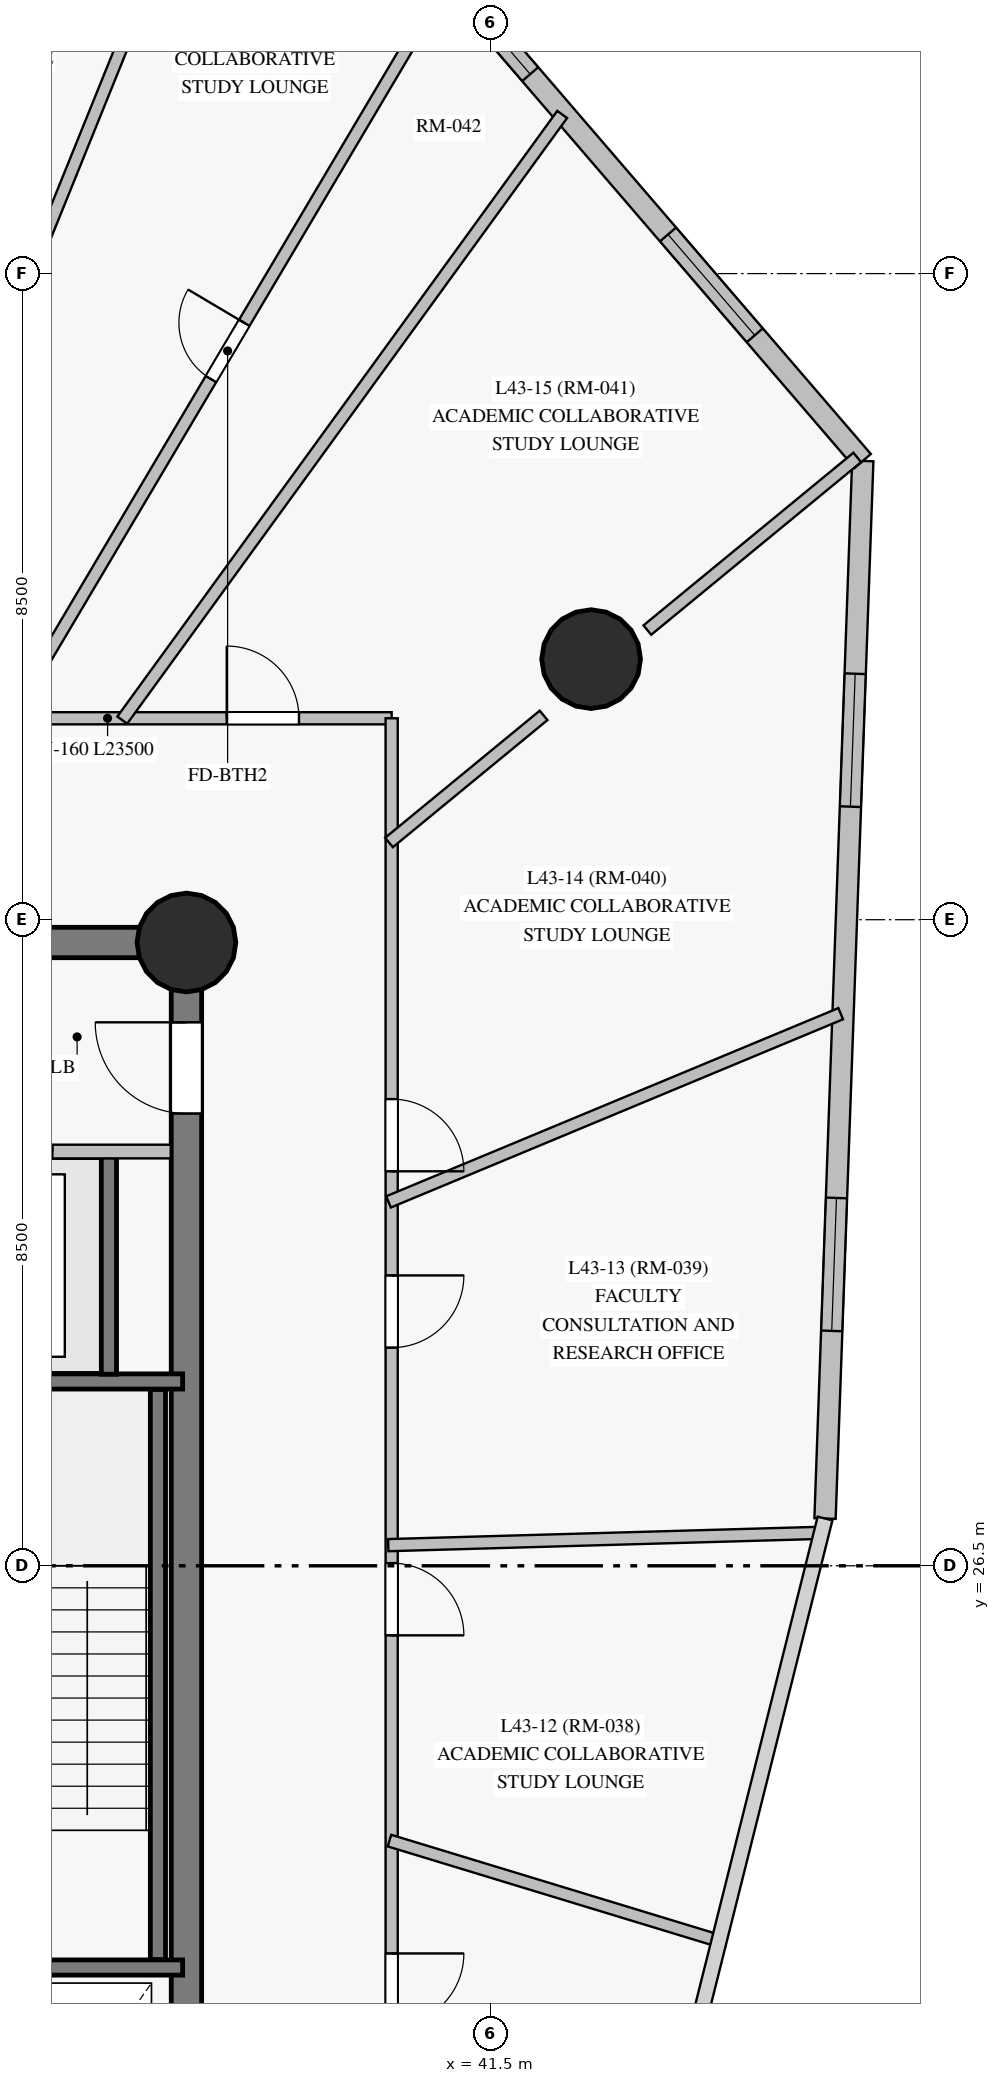
"""IFC4 building model, lengths in metres.
Left out: names, types, materials, properties, quantities, classifications, styles, units other than length and angle.
Written with IfcOpenShell. Run it as: python <this file> out.ifc"""

import sys

from ifc_helpers import new_model, si_unit, direction, frame, frame_2d, origin, origin_with_axes, origin_2d, place, context, subcontext, project, spatial, rectangle, circle, extrude, source, transform, mapped, element, fill, save


model = new_model("IFC4")
c1 = context("Model", 3, precision=1e-05, world=origin(), true_north=direction((0.0, 1.0)))
c2 = subcontext(c1, "Body", "Model", "MODEL_VIEW")
j1 = project(units=[si_unit("LENGTHUNIT", "METRE"), si_unit("PLANEANGLEUNIT", "RADIAN")], contexts=[c1])
p1 = place(None, origin())
s1 = spatial("IfcSite", under=j1, at=p1, CompositionType="ELEMENT")
p2 = place(p1, origin())
s2 = spatial("IfcBuilding", under=s1, at=p2, CompositionType="ELEMENT")
p3 = place(p2, frame((0.0, 0.0, 152.55)))
s3 = spatial("IfcBuildingStorey", under=s2, at=p3, CompositionType="ELEMENT", Elevation=152.55)
p4 = place(p3, frame((37.5, 18.3, 0.0), z_axis=(0.0, 0.0, 1.0), x_axis=(0.0, 1.0, 0.0)))
e1 = element("IfcWall", 1, at=p4, inside=s3, PredefinedType="SHEAR", context=c2, shape_type="SweptSolid", body=[
    extrude(rectangle(XDim=16.4, YDim=0.4, at=frame_2d((8.2, 0.0))), origin(), (0.0, 0.0, 1.0), 3.775),
])
p5 = place(p4, frame((14.15, 0.0, 0.0)))
e2 = element("IfcOpeningElement", 2, at=p5, cuts=e1, PredefinedType="OPENING", context=c2, shape_type="SweptSolid", body=[
    extrude(rectangle(XDim=1.2, YDim=2.15, at=frame_2d((0.6, 1.075))), frame((0.0, 0.21, 0.0), z_axis=(0.0, -1.0, 0.0), x_axis=(1.0, 0.0, 0.0)), (0.0, 0.0, 1.0), 0.42),
])
p6 = place(p3, frame((37.5, 34.7, 0.0), z_axis=(0.0, 0.0, 1.0), x_axis=(-1.0, 0.0, 0.0)))
e3 = element("IfcWall", 3, at=p6, inside=s3, PredefinedType="SHEAR", context=c2, shape_type="SweptSolid", body=[
    extrude(rectangle(XDim=10.95, YDim=0.4, at=frame_2d((5.475, 0.0))), origin(), (0.0, 0.0, 1.0), 3.775),
])
p7 = place(p6, frame((2.15, 0.0, 0.0)))
e4 = element("IfcOpeningElement", 4, at=p7, cuts=e3, PredefinedType="OPENING", context=c2, shape_type="SweptSolid", body=[
    extrude(rectangle(XDim=1.2, YDim=2.15, at=frame_2d((0.6, 1.075))), frame((0.0, 0.21, 0.0), z_axis=(0.0, -1.0, 0.0), x_axis=(1.0, 0.0, 0.0)), (0.0, 0.0, 1.0), 0.42),
])
p8 = place(p6, frame((6.35, 0.0, 0.0)))
e5 = element("IfcOpeningElement", 5, at=p8, cuts=e3, PredefinedType="OPENING", context=c2, shape_type="SweptSolid", body=[
    extrude(rectangle(XDim=1.1, YDim=2.15, at=frame_2d((0.55, 1.075))), frame((0.0, 0.21, 0.0), z_axis=(0.0, -1.0, 0.0), x_axis=(1.0, 0.0, 0.0)), (0.0, 0.0, 1.0), 0.42),
])
m1 = source(origin_with_axes(), c2, "Body", "SweptSolid", [
    extrude(circle(Radius=0.65, at=origin_2d()), origin(), (0.0, 0.0, 1.0), 4.0),
])
for number, where, z_axis, x_axis in (
    (6, (37.5, 34.7, 0.0), (0.0, 0.0, 1.0), (1.0, 0.0, 0.0)),
    (7, (42.824, 38.428, 0.0), (0.0, 0.0, 1.0), (1.0, 0.0, 0.0)),
):
    element("IfcColumn", number, at=place(p3, frame(where, z_axis=z_axis, x_axis=x_axis)), inside=s3, PredefinedType="COLUMN", context=c2, shape_type="MappedRepresentation", body=[
        mapped(m1, transform((0.0, 0.0, 0.0), scale=1.0)),
    ])
p9 = place(p3, frame((45.902, 27.122, 0.0), z_axis=(0.0, 0.0, 1.0), x_axis=(0.03566776227, 0.99936370293, 0.0)))
e8 = element("IfcWall", 8, at=p9, inside=s3, PredefinedType="SOLIDWALL", context=c2, shape_type="SweptSolid", body=[
    extrude(rectangle(XDim=13.922, YDim=0.28, at=frame_2d((6.961, 0.0))), origin(), (0.0, 0.0, 1.0), 3.775),
])
p10 = place(p9, frame((2.47, 0.0, 0.85)))
e9 = element("IfcOpeningElement", 9, at=p10, cuts=e8, PredefinedType="OPENING", context=c2, shape_type="SweptSolid", body=[
    extrude(rectangle(XDim=1.75, YDim=1.65, at=frame_2d((0.875, 0.825))), frame((0.0, 0.15, 0.0), z_axis=(0.0, -1.0, 0.0), x_axis=(1.0, 0.0, 0.0)), (0.0, 0.0, 1.0), 0.3),
])
p11 = place(p9, frame((9.371, 0.0, 0.85)))
e10 = element("IfcOpeningElement", 10, at=p11, cuts=e8, PredefinedType="OPENING", context=c2, shape_type="SweptSolid", body=[
    extrude(rectangle(XDim=1.75, YDim=1.65, at=frame_2d((0.875, 0.825))), frame((0.0, 0.15, 0.0), z_axis=(0.0, -1.0, 0.0), x_axis=(1.0, 0.0, 0.0)), (0.0, 0.0, 1.0), 0.3),
])
p12 = place(p3, frame((46.398, 41.035, 0.0), z_axis=(0.0, 0.0, 1.0), x_axis=(-0.65197022464, 0.758244568845, 0.0)))
e11 = element("IfcWall", 11, at=p12, inside=s3, PredefinedType="SOLIDWALL", context=c2, shape_type="SweptSolid", body=[
    extrude(rectangle(XDim=9.391, YDim=0.28, at=frame_2d((4.696, 0.0))), origin(), (0.0, 0.0, 1.0), 3.775),
])
p13 = place(p12, frame((2.18, 0.0, 0.85)))
e12 = element("IfcOpeningElement", 12, at=p13, cuts=e11, PredefinedType="OPENING", context=c2, shape_type="SweptSolid", body=[
    extrude(rectangle(XDim=1.75, YDim=1.65, at=frame_2d((0.875, 0.825))), frame((0.0, 0.15, 0.0), z_axis=(0.0, -1.0, 0.0), x_axis=(1.0, 0.0, 0.0)), (0.0, 0.0, 1.0), 0.3),
])
p14 = place(p12, frame((6.711, 0.0, 0.85)))
e13 = element("IfcOpeningElement", 13, at=p14, cuts=e11, PredefinedType="OPENING", context=c2, shape_type="SweptSolid", body=[
    extrude(rectangle(XDim=0.95, YDim=1.5, at=frame_2d((0.475, 0.75))), frame((0.0, 0.15, 0.0), z_axis=(0.0, -1.0, 0.0), x_axis=(1.0, 0.0, 0.0)), (0.0, 0.0, 1.0), 0.3),
])
p15 = place(p3, frame((37.125, 21.32, 0.0), z_axis=(0.0, 0.0, 1.0), x_axis=(0.0, 1.0, 0.0)))
e14 = element("IfcWall", 14, at=p15, inside=s3, PredefinedType="SHEAR", context=c2, shape_type="SweptSolid", body=[
    extrude(rectangle(XDim=7.5, YDim=0.2, at=frame_2d((3.75, 0.0))), origin(), (0.0, 0.0, 1.0), 3.775),
])
for number, where, z_axis, x_axis in (
    (15, (33.455, 21.215, 0.0), (0.0, 0.0, 1.0), (1.0, 0.0, 0.0)),
    (16, (33.455, 28.925, 0.0), (0.0, 0.0, 1.0), (1.0, 0.0, 0.0)),
):
    element("IfcWall", number, at=place(p3, frame(where, z_axis=z_axis, x_axis=x_axis)), inside=s3, PredefinedType="SHEAR", context=c2, shape_type="SweptSolid", body=[
        extrude(rectangle(XDim=3.995, YDim=0.2, at=frame_2d((1.998, 0.0))), origin(), (0.0, 0.0, 1.0), 3.775),
    ])
p16 = place(p3, frame((36.48, 29.02, 0.0), z_axis=(0.0, 0.0, 1.0), x_axis=(0.0, 1.0, 0.0)))
e17 = element("IfcWall", 17, at=p16, inside=s3, PredefinedType="SHEAR", context=c2, shape_type="SweptSolid", body=[
    extrude(rectangle(XDim=2.86, YDim=0.2, at=frame_2d((1.43, 0.0))), origin(), (0.0, 0.0, 1.0), 3.775),
])
p17 = place(p3, frame((16.7, 37.65, 0.0), z_axis=(0.0, 0.0, 1.0), x_axis=(1.0, 0.0, 0.0)))
e18 = element("IfcWall", 18, at=p17, inside=s3, PredefinedType="PARTITIONING", context=c2, shape_type="SweptSolid", body=[
    extrude(rectangle(XDim=23.5, YDim=0.16, at=frame_2d((11.75, 0.0))), origin(), (0.0, 0.0, 1.0), 3.325),
])
p18 = place(p17, frame((21.331, 0.0, 0.0)))
e19 = element("IfcOpeningElement", 19, at=p18, cuts=e18, PredefinedType="OPENING", context=c2, shape_type="SweptSolid", body=[
    extrude(rectangle(XDim=0.95, YDim=2.15, at=frame_2d((0.475, 1.075))), frame((0.0, 0.09, 0.0), z_axis=(0.0, -1.0, 0.0), x_axis=(1.0, 0.0, 0.0)), (0.0, 0.0, 1.0), 0.18),
])
p19 = place(p17, frame((17.334, 0.0, 0.0)))
e20 = element("IfcOpeningElement", 20, at=p19, cuts=e18, PredefinedType="OPENING", context=c2, shape_type="SweptSolid", body=[
    extrude(rectangle(XDim=0.86, YDim=2.1, at=frame_2d((0.43, 1.05))), frame((0.0, 0.09, 0.0), z_axis=(0.0, -1.0, 0.0), x_axis=(1.0, 0.0, 0.0)), (0.0, 0.0, 1.0), 0.18),
])
p20 = place(p17, frame((15.16, 0.0, 0.0)))
e21 = element("IfcOpeningElement", 21, at=p20, cuts=e18, PredefinedType="OPENING", context=c2, shape_type="SweptSolid", body=[
    extrude(rectangle(XDim=0.95, YDim=2.15, at=frame_2d((0.475, 1.075))), frame((0.0, 0.09, 0.0), z_axis=(0.0, -1.0, 0.0), x_axis=(1.0, 0.0, 0.0)), (0.0, 0.0, 1.0), 0.18),
])
p21 = place(p17, frame((13.06, 0.0, 0.0)))
e22 = element("IfcOpeningElement", 22, at=p21, cuts=e18, PredefinedType="OPENING", context=c2, shape_type="SweptSolid", body=[
    extrude(rectangle(XDim=0.95, YDim=2.15, at=frame_2d((0.475, 1.075))), frame((0.0, 0.09, 0.0), z_axis=(0.0, -1.0, 0.0), x_axis=(1.0, 0.0, 0.0)), (0.0, 0.0, 1.0), 0.18),
])
p22 = place(p17, frame((10.973, 0.0, 0.0)))
e23 = element("IfcOpeningElement", 23, at=p22, cuts=e18, PredefinedType="OPENING", context=c2, shape_type="SweptSolid", body=[
    extrude(rectangle(XDim=0.95, YDim=2.15, at=frame_2d((0.475, 1.075))), frame((0.0, 0.09, 0.0), z_axis=(0.0, -1.0, 0.0), x_axis=(1.0, 0.0, 0.0)), (0.0, 0.0, 1.0), 0.18),
])
p23 = place(p17, frame((8.885, 0.0, 0.0)))
e24 = element("IfcOpeningElement", 24, at=p23, cuts=e18, PredefinedType="OPENING", context=c2, shape_type="SweptSolid", body=[
    extrude(rectangle(XDim=0.95, YDim=2.15, at=frame_2d((0.475, 1.075))), frame((0.0, 0.09, 0.0), z_axis=(0.0, -1.0, 0.0), x_axis=(1.0, 0.0, 0.0)), (0.0, 0.0, 1.0), 0.18),
])
p24 = place(p17, frame((6.61, 0.0, 0.0)))
e25 = element("IfcOpeningElement", 25, at=p24, cuts=e18, PredefinedType="OPENING", context=c2, shape_type="SweptSolid", body=[
    extrude(rectangle(XDim=0.95, YDim=2.15, at=frame_2d((0.475, 1.075))), frame((0.0, 0.09, 0.0), z_axis=(0.0, -1.0, 0.0), x_axis=(1.0, 0.0, 0.0)), (0.0, 0.0, 1.0), 0.18),
])
p25 = place(p17, frame((4.21, 0.0, 0.0)))
e26 = element("IfcOpeningElement", 26, at=p25, cuts=e18, PredefinedType="OPENING", context=c2, shape_type="SweptSolid", body=[
    extrude(rectangle(XDim=0.95, YDim=2.15, at=frame_2d((0.475, 1.075))), frame((0.0, 0.09, 0.0), z_axis=(0.0, -1.0, 0.0), x_axis=(1.0, 0.0, 0.0)), (0.0, 0.0, 1.0), 0.18),
])
p26 = place(p17, frame((2.482, 0.0, 0.0)))
e27 = element("IfcOpeningElement", 27, at=p26, cuts=e18, PredefinedType="OPENING", context=c2, shape_type="SweptSolid", body=[
    extrude(rectangle(XDim=0.95, YDim=2.15, at=frame_2d((0.475, 1.075))), frame((0.0, 0.09, 0.0), z_axis=(0.0, -1.0, 0.0), x_axis=(1.0, 0.0, 0.0)), (0.0, 0.0, 1.0), 0.18),
])
p27 = place(p3, frame((40.2, 37.65, 0.0), z_axis=(0.0, 0.0, 1.0), x_axis=(0.0, -1.0, 0.0)))
e28 = element("IfcWall", 28, at=p27, inside=s3, PredefinedType="PARTITIONING", context=c2, shape_type="SweptSolid", body=[
    extrude(rectangle(XDim=22.3, YDim=0.16, at=frame_2d((11.15, 0.0))), origin(), (0.0, 0.0, 1.0), 3.325),
])
p28 = place(p27, frame((16.25, 0.0, 0.0)))
e29 = element("IfcOpeningElement", 29, at=p28, cuts=e28, PredefinedType="OPENING", context=c2, shape_type="SweptSolid", body=[
    extrude(rectangle(XDim=0.95, YDim=2.15, at=frame_2d((0.475, 1.075))), frame((0.0, 0.09, 0.0), z_axis=(0.0, -1.0, 0.0), x_axis=(1.0, 0.0, 0.0)), (0.0, 0.0, 1.0), 0.18),
])
p29 = place(p27, frame((11.115, 0.0, 0.0)))
e30 = element("IfcOpeningElement", 30, at=p29, cuts=e28, PredefinedType="OPENING", context=c2, shape_type="SweptSolid", body=[
    extrude(rectangle(XDim=0.95, YDim=2.15, at=frame_2d((0.475, 1.075))), frame((0.0, 0.09, 0.0), z_axis=(0.0, -1.0, 0.0), x_axis=(1.0, 0.0, 0.0)), (0.0, 0.0, 1.0), 0.18),
])
p30 = place(p27, frame((7.33, 0.0, 0.0)))
e31 = element("IfcOpeningElement", 31, at=p30, cuts=e28, PredefinedType="OPENING", context=c2, shape_type="SweptSolid", body=[
    extrude(rectangle(XDim=0.95, YDim=2.15, at=frame_2d((0.475, 1.075))), frame((0.0, 0.09, 0.0), z_axis=(0.0, -1.0, 0.0), x_axis=(1.0, 0.0, 0.0)), (0.0, 0.0, 1.0), 0.18),
])
p31 = place(p27, frame((5.01, 0.0, 0.0)))
e32 = element("IfcOpeningElement", 32, at=p31, cuts=e28, PredefinedType="OPENING", context=c2, shape_type="SweptSolid", body=[
    extrude(rectangle(XDim=0.95, YDim=2.15, at=frame_2d((0.475, 1.075))), frame((0.0, 0.09, 0.0), z_axis=(0.0, -1.0, 0.0), x_axis=(1.0, 0.0, 0.0)), (0.0, 0.0, 1.0), 0.18),
])
p32 = place(p3, frame((33.059, 37.608, 0.0), z_axis=(0.0, 0.0, 1.0), x_axis=(0.375071800274, 0.926995763011, 0.0)))
e33 = element("IfcWall", 33, at=p32, inside=s3, PredefinedType="PARTITIONING", context=c2, shape_type="SweptSolid", body=[
    extrude(rectangle(XDim=11.769, YDim=0.16, at=frame_2d((5.884, 0.0))), origin(), (0.0, 0.0, 1.0), 3.775),
])
p33 = place(p3, frame((35.155, 37.611, 0.0), z_axis=(0.0, 0.0, 1.0), x_axis=(0.509830756174, 0.860274723597, 0.0)))
e34 = element("IfcWall", 34, at=p33, inside=s3, PredefinedType="PARTITIONING", context=c2, shape_type="SweptSolid", body=[
    extrude(rectangle(XDim=11.324, YDim=0.16, at=frame_2d((5.662, 0.0))), origin(), (0.0, 0.0, 1.0), 3.775),
])
p34 = place(p33, frame((5.232, 0.0, 0.0)))
e35 = element("IfcOpeningElement", 35, at=p34, cuts=e34, PredefinedType="OPENING", context=c2, shape_type="SweptSolid", body=[
    extrude(rectangle(XDim=0.86, YDim=2.04, at=frame_2d((0.43, 1.02))), frame((0.0, 0.09, 0.0), z_axis=(0.0, -1.0, 0.0), x_axis=(1.0, 0.0, 0.0)), (0.0, 0.0, 1.0), 0.18),
])
p35 = place(p3, frame((36.656, 37.626, 0.0), z_axis=(0.0, 0.0, 1.0), x_axis=(0.587701388375, 0.809077918437, 0.0)))
e36 = element("IfcWall", 36, at=p35, inside=s3, PredefinedType="PARTITIONING", context=c2, shape_type="SweptSolid", body=[
    extrude(rectangle(XDim=9.848, YDim=0.16, at=frame_2d((4.924, 0.0))), origin(), (0.0, 0.0, 1.0), 3.775),
])
p36 = place(p3, frame((40.158, 31.287, 0.0), z_axis=(0.0, 0.0, 1.0), x_axis=(0.923229295119, 0.384249487487, 0.0)))
e37 = element("IfcWall", 37, at=p36, inside=s3, PredefinedType="PARTITIONING", context=c2, shape_type="SweptSolid", body=[
    extrude(rectangle(XDim=6.444, YDim=0.16, at=frame_2d((3.222, 0.0))), origin(), (0.0, 0.0, 1.0), 3.775),
])
p37 = place(p3, frame((40.155, 26.771, 0.0), z_axis=(0.0, 0.0, 1.0), x_axis=(0.999594119788, 0.028488518482, 0.0)))
e38 = element("IfcWall", 38, at=p37, inside=s3, PredefinedType="PARTITIONING", context=c2, shape_type="SweptSolid", body=[
    extrude(rectangle(XDim=5.673, YDim=0.16, at=frame_2d((2.836, 0.0))), origin(), (0.0, 0.0, 1.0), 3.775),
])
p38 = place(p3, frame((40.171, 22.885, 0.0), z_axis=(0.0, 0.0, 1.0), x_axis=(0.956654200198, -0.291226271554, 0.0)))
e39 = element("IfcWall", 39, at=p38, inside=s3, PredefinedType="PARTITIONING", context=c2, shape_type="SweptSolid", body=[
    extrude(rectangle(XDim=4.508, YDim=0.16, at=frame_2d((2.254, 0.0))), origin(), (0.0, 0.0, 1.0), 3.775),
])
p39 = place(p3, frame((33.535, 31.95, 0.0), z_axis=(0.0, 0.0, 1.0), x_axis=(1.0, 0.0, 0.0)))
e40 = element("IfcWall", 40, at=p39, inside=s3, PredefinedType="PARTITIONING", context=c2, shape_type="SweptSolid", body=[
    extrude(rectangle(XDim=3.759, YDim=0.18, at=frame_2d((1.879, 0.0))), origin(), (0.0, 0.0, 1.0), 3.775),
])
p40 = place(p39, frame((0.9, 0.0, 0.0)))
e41 = element("IfcOpeningElement", 41, at=p40, cuts=e40, PredefinedType="OPENING", context=c2, shape_type="SweptSolid", body=[
    extrude(rectangle(XDim=1.3, YDim=2.2, at=frame_2d((0.65, 1.1))), frame((0.0, 0.1, 0.0), z_axis=(0.0, -1.0, 0.0), x_axis=(1.0, 0.0, 0.0)), (0.0, 0.0, 1.0), 0.2),
])
p41 = place(p3, frame((43.564, 38.811, 0.0), z_axis=(0.0, 0.0, 1.0), x_axis=(0.772363696514, 0.635180541506, 0.0)))
e42 = element("IfcWall", 42, at=p41, inside=s3, PredefinedType="PARTITIONING", context=c2, shape_type="SweptSolid", body=[
    extrude(rectangle(XDim=3.575, YDim=0.16, at=frame_2d((1.788, 0.0))), origin(), (0.0, 0.0, 1.0), 3.775),
])
p42 = place(p3, frame((40.165, 36.015, 0.0), z_axis=(0.0, 0.0, 1.0), x_axis=(0.77233956331, 0.635209885743, 0.0)))
e43 = element("IfcWall", 43, at=p42, inside=s3, PredefinedType="PARTITIONING", context=c2, shape_type="SweptSolid", body=[
    extrude(rectangle(XDim=2.633, YDim=0.16, at=frame_2d((1.316, 0.0))), origin(), (0.0, 0.0, 1.0), 2.975),
])
m2 = source(origin_with_axes(), c2, "Body", "SweptSolid", [
    extrude(rectangle(XDim=1.75, YDim=1.65, at=frame_2d((0.875, 0.825))), frame((0.0, 0.03, 0.0), z_axis=(0.0, -1.0, 0.0), x_axis=(1.0, 0.0, 0.0)), (0.0, 0.0, 1.0), 0.06),
])
p43 = place(p10, origin())
e44 = element("IfcWindow", 44, at=p43, inside=s3, PartitioningType="SINGLE_PANEL", PredefinedType="WINDOW", context=c2, shape_type="MappedRepresentation", body=[
    mapped(m2, transform((0.0, 0.0, 0.0), scale=1.0)),
])
fill(e9, e44)
p44 = place(p11, origin())
e45 = element("IfcWindow", 45, at=p44, inside=s3, PartitioningType="SINGLE_PANEL", PredefinedType="WINDOW", context=c2, shape_type="MappedRepresentation", body=[
    mapped(m2, transform((0.0, 0.0, 0.0), scale=1.0)),
])
fill(e10, e45)
p45 = place(p13, origin())
e46 = element("IfcWindow", 46, at=p45, inside=s3, PartitioningType="SINGLE_PANEL", PredefinedType="WINDOW", context=c2, shape_type="MappedRepresentation", body=[
    mapped(m2, transform((0.0, 0.0, 0.0), scale=1.0)),
])
fill(e12, e46)
m3 = source(origin_with_axes(), c2, "Body", "SweptSolid", [
    extrude(rectangle(XDim=0.95, YDim=1.5, at=frame_2d((0.475, 0.75))), frame((0.0, 0.03, 0.0), z_axis=(0.0, -1.0, 0.0), x_axis=(1.0, 0.0, 0.0)), (0.0, 0.0, 1.0), 0.06),
])
p46 = place(p14, origin())
e47 = element("IfcWindow", 47, at=p46, inside=s3, PartitioningType="SINGLE_PANEL", PredefinedType="WINDOW", context=c2, shape_type="MappedRepresentation", body=[
    mapped(m3, transform((0.0, 0.0, 0.0), scale=1.0)),
])
fill(e13, e47)
m4 = source(origin_with_axes(), c2, "Body", "SweptSolid", [
    extrude(rectangle(XDim=1.2, YDim=2.15, at=frame_2d((0.6, 1.075))), frame((0.0, 0.025, 0.0), z_axis=(0.0, -1.0, 0.0), x_axis=(1.0, 0.0, 0.0)), (0.0, 0.0, 1.0), 0.05),
])
p47 = place(p5, origin())
e48 = element("IfcDoor", 48, at=p47, inside=s3, OperationType="SINGLE_SWING_RIGHT", PredefinedType="DOOR", context=c2, shape_type="MappedRepresentation", body=[
    mapped(m4, transform((0.0, 0.0, 0.0), scale=1.0)),
])
fill(e2, e48)
m5 = source(origin_with_axes(), c2, "Body", "SweptSolid", [
    extrude(rectangle(XDim=1.3, YDim=2.2, at=frame_2d((0.65, 1.1))), frame((0.0, 0.025, 0.0), z_axis=(0.0, -1.0, 0.0), x_axis=(1.0, 0.0, 0.0)), (0.0, 0.0, 1.0), 0.05),
])
p48 = place(p40, origin())
e49 = element("IfcDoor", 49, at=p48, inside=s3, OperationType="SLIDING_TO_LEFT", PredefinedType="DOOR", context=c2, shape_type="MappedRepresentation", body=[
    mapped(m5, transform((0.0, 0.0, 0.0), scale=1.0)),
])
fill(e41, e49)
m6 = source(origin_with_axes(), c2, "Body", "SweptSolid", [
    extrude(rectangle(XDim=0.95, YDim=2.15, at=frame_2d((0.475, 1.075))), frame((0.0, 0.025, 0.0), z_axis=(0.0, -1.0, 0.0), x_axis=(1.0, 0.0, 0.0)), (0.0, 0.0, 1.0), 0.05),
])
p49 = place(p28, origin())
e50 = element("IfcDoor", 50, at=p49, inside=s3, OperationType="SINGLE_SWING_LEFT", PredefinedType="DOOR", context=c2, shape_type="MappedRepresentation", body=[
    mapped(m6, transform((0.0, 0.0, 0.0), scale=1.0)),
])
fill(e29, e50)
p50 = place(p29, origin())
e51 = element("IfcDoor", 51, at=p50, inside=s3, OperationType="SINGLE_SWING_RIGHT", PredefinedType="DOOR", context=c2, shape_type="MappedRepresentation", body=[
    mapped(m6, transform((0.0, 0.0, 0.0), scale=1.0)),
])
fill(e30, e51)
p51 = place(p30, origin())
e52 = element("IfcDoor", 52, at=p51, inside=s3, OperationType="SINGLE_SWING_LEFT", PredefinedType="DOOR", context=c2, shape_type="MappedRepresentation", body=[
    mapped(m6, transform((0.0, 0.0, 0.0), scale=1.0)),
])
fill(e31, e52)
p52 = place(p31, origin())
e53 = element("IfcDoor", 53, at=p52, inside=s3, OperationType="SINGLE_SWING_RIGHT", PredefinedType="DOOR", context=c2, shape_type="MappedRepresentation", body=[
    mapped(m6, transform((0.0, 0.0, 0.0), scale=1.0)),
])
fill(e32, e53)
p53 = place(p18, origin())
e54 = element("IfcDoor", 54, at=p53, inside=s3, OperationType="SINGLE_SWING_LEFT", PredefinedType="DOOR", context=c2, shape_type="MappedRepresentation", body=[
    mapped(m6, transform((0.0, 0.0, 0.0), scale=1.0)),
])
fill(e19, e54)
m7 = source(origin_with_axes(), c2, "Body", "SweptSolid", [
    extrude(rectangle(XDim=0.86, YDim=2.04, at=frame_2d((0.43, 1.02))), frame((0.0, 0.025, 0.0), z_axis=(0.0, -1.0, 0.0), x_axis=(1.0, 0.0, 0.0)), (0.0, 0.0, 1.0), 0.05),
])
p54 = place(p34, origin())
e55 = element("IfcDoor", 55, at=p54, inside=s3, OperationType="SINGLE_SWING_RIGHT", PredefinedType="DOOR", context=c2, shape_type="MappedRepresentation", body=[
    mapped(m7, transform((0.0, 0.0, 0.0), scale=1.0)),
])
fill(e35, e55)
save(model, sys.argv[1])
